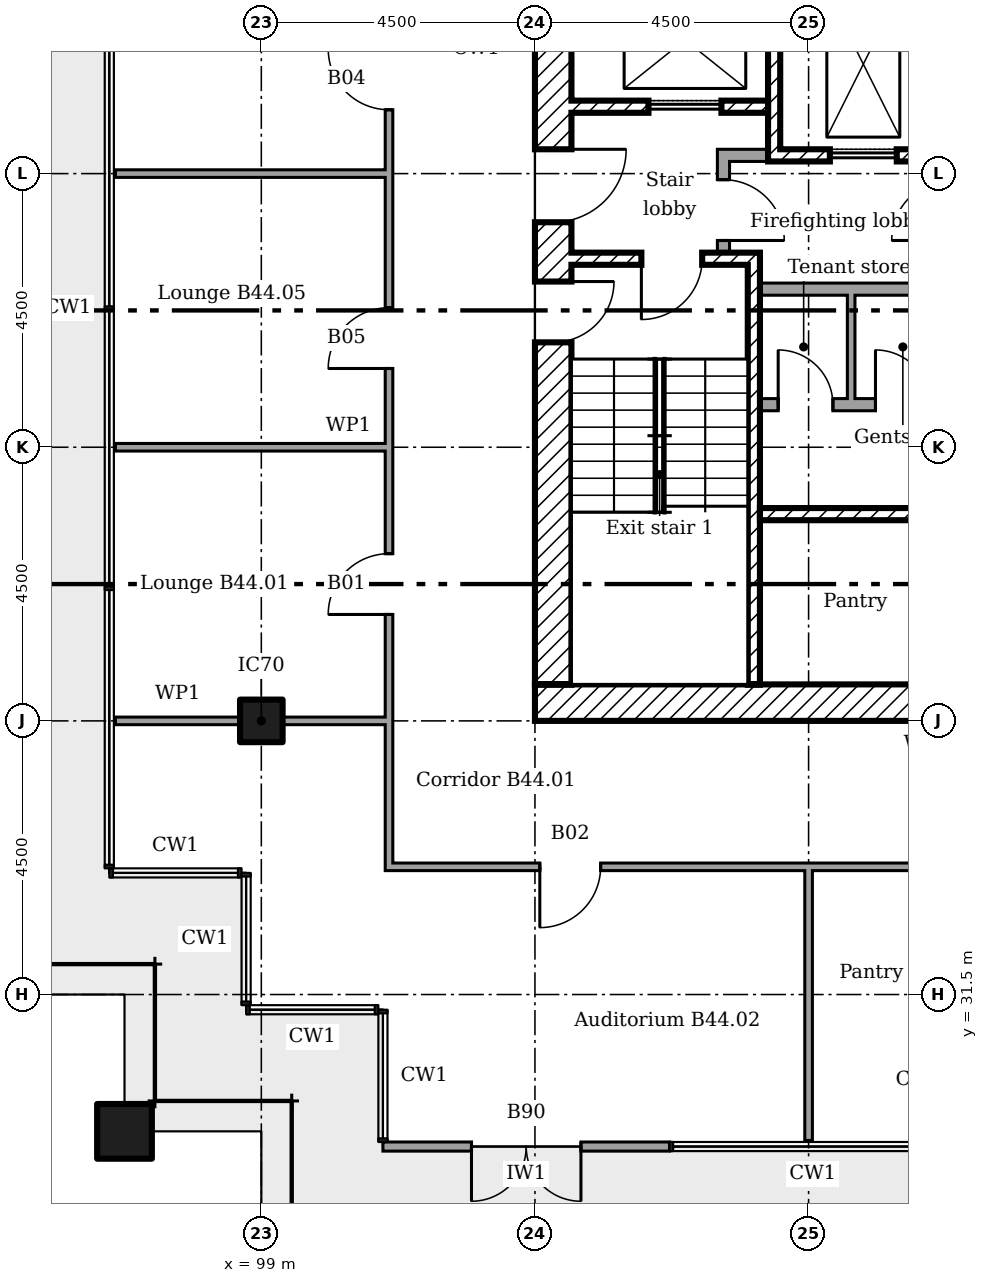
"""IFC4 building model, lengths in metres.
Left out: names, types, materials, properties, quantities, classifications, styles, units other than length and angle.
Written with IfcOpenShell. Run it as: python <this file> out.ifc"""

import sys

from ifc_helpers import new_model, si_unit, direction, frame, frame_2d, origin, origin_2d, place, context, subcontext, project, spatial, rectangle, extrude, element, fill, save


model = new_model("IFC4")
c1 = context("Model", 3, precision=1e-05, world=origin(), true_north=direction((0.0, 1.0)))
c2 = subcontext(c1, "Body", "Model", "MODEL_VIEW")
j1 = project(units=[si_unit("LENGTHUNIT", "METRE"), si_unit("PLANEANGLEUNIT", "RADIAN")], contexts=[c1])
p1 = place(None, origin())
s1 = spatial("IfcSite", under=j1, at=p1, CompositionType="ELEMENT")
p2 = place(p1, origin())
s2 = spatial("IfcBuilding", under=s1, at=p2, CompositionType="ELEMENT")
p3 = place(p2, frame((0.0, 0.0, 176.2)))
s3 = spatial("IfcBuildingStorey", under=s2, at=p3, CompositionType="ELEMENT", Elevation=176.2)
p4 = place(p3, frame((96.75, 29.25, 0.0)))
e1 = element("IfcColumn", 1, at=p4, inside=s3, PredefinedType="COLUMN", context=c2, shape_type="SweptSolid", body=[
    extrude(rectangle(XDim=0.9, YDim=0.9, at=origin_2d()), origin(), (0.0, 0.0, 1.0), 3.6),
])
p5 = place(p3, frame((99.0, 36.0, 0.0)))
e2 = element("IfcColumn", 2, at=p5, inside=s3, PredefinedType="COLUMN", context=c2, shape_type="SweptSolid", body=[
    extrude(rectangle(XDim=0.7, YDim=0.7, at=origin_2d()), origin(), (0.0, 0.0, 1.0), 3.6),
])
p6 = place(p3, frame((101.0, 29.0, 0.0)))
e3 = element("IfcWall", 3, at=p6, inside=s3, PredefinedType="SOLIDWALL", context=c2, shape_type="SweptSolid", body=[
    extrude(rectangle(XDim=4.712, YDim=0.15, at=frame_2d((2.356, 0.0))), origin(), (0.0, 0.0, 1.0), 3.45),
])
p7 = place(p6, frame((1.456, 0.0, 0.0)))
e4 = element("IfcOpeningElement", 4, at=p7, cuts=e3, PredefinedType="OPENING", context=c2, shape_type="SweptSolid", body=[
    extrude(rectangle(XDim=1.8, YDim=2.4, at=frame_2d((0.9, 1.2))), frame((0.0, 0.085, 0.0), z_axis=(0.0, -1.0, 0.0), x_axis=(1.0, 0.0, 0.0)), (0.0, 0.0, 1.0), 0.17),
])
p8 = place(p3, frame((103.5, 36.3, 0.0)))
e5 = element("IfcWall", 5, at=p8, inside=s3, PredefinedType="SHEAR", context=c2, shape_type="SweptSolid", body=[
    extrude(rectangle(XDim=12.9, YDim=0.6, at=frame_2d((6.45, 0.0))), origin(), (0.0, 0.0, 1.0), 3.35),
])
p9 = place(p3, frame((103.8, 36.6, 0.0), z_axis=(0.0, 0.0, 1.0), x_axis=(0.0, 1.0, 0.0)))
e6 = element("IfcWall", 6, at=p9, inside=s3, PredefinedType="SHEAR", context=c2, shape_type="SweptSolid", body=[
    extrude(rectangle(XDim=12.3, YDim=0.6, at=frame_2d((6.15, 0.0))), origin(), (0.0, 0.0, 1.0), 3.35),
])
p10 = place(p9, frame((7.6, 0.0, 0.0)))
e7 = element("IfcOpeningElement", 7, at=p10, cuts=e6, PredefinedType="OPENING", context=c2, shape_type="SweptSolid", body=[
    extrude(rectangle(XDim=1.2, YDim=2.1, at=frame_2d((0.6, 1.05))), frame((0.0, 0.31, 0.0), z_axis=(0.0, -1.0, 0.0), x_axis=(1.0, 0.0, 0.0)), (0.0, 0.0, 1.0), 0.62),
])
p11 = place(p9, frame((5.625, 0.0, 0.0)))
e8 = element("IfcOpeningElement", 8, at=p11, cuts=e6, PredefinedType="OPENING", context=c2, shape_type="SweptSolid", body=[
    extrude(rectangle(XDim=1.0, YDim=2.1, at=frame_2d((0.5, 1.05))), frame((0.0, 0.31, 0.0), z_axis=(0.0, -1.0, 0.0), x_axis=(1.0, 0.0, 0.0)), (0.0, 0.0, 1.0), 0.62),
])
p12 = place(p3, frame((107.433, 48.9, 0.0), z_axis=(0.0, 0.0, 1.0), x_axis=(0.0, -1.0, 0.0)))
e9 = element("IfcWall", 9, at=p12, inside=s3, PredefinedType="SHEAR", context=c2, shape_type="SweptSolid", body=[
    extrude(rectangle(XDim=3.7, YDim=0.2, at=frame_2d((1.85, 0.0))), origin(), (0.0, 0.0, 1.0), 3.35),
])
p13 = place(p3, frame((106.5, 45.3, 0.0)))
e10 = element("IfcWall", 10, at=p13, inside=s3, PredefinedType="PARTITIONING", context=c2, shape_type="SweptSolid", body=[
    extrude(rectangle(XDim=0.833, YDim=0.2, at=frame_2d((0.417, 0.0))), origin(), (0.0, 0.0, 1.0), 3.35),
])
p14 = place(p3, frame((106.6, 43.7, 0.0), z_axis=(0.0, 0.0, 1.0), x_axis=(0.0, 1.0, 0.0)))
e11 = element("IfcWall", 11, at=p14, inside=s3, PredefinedType="PARTITIONING", context=c2, shape_type="SweptSolid", body=[
    extrude(rectangle(XDim=1.5, YDim=0.2, at=frame_2d((0.75, 0.0))), origin(), (0.0, 0.0, 1.0), 3.35),
])
p15 = place(p14, frame((0.2, 0.0, 0.0)))
e12 = element("IfcOpeningElement", 12, at=p15, cuts=e11, PredefinedType="OPENING", context=c2, shape_type="SweptSolid", body=[
    extrude(rectangle(XDim=1.0, YDim=2.1, at=frame_2d((0.5, 1.05))), frame((0.0, 0.11, 0.0), z_axis=(0.0, -1.0, 0.0), x_axis=(1.0, 0.0, 0.0)), (0.0, 0.0, 1.0), 0.22),
])
p16 = place(p3, frame((104.1, 46.1, 0.0)))
e13 = element("IfcWall", 13, at=p16, inside=s3, PredefinedType="SHEAR", context=c2, shape_type="SweptSolid", body=[
    extrude(rectangle(XDim=3.233, YDim=0.2, at=frame_2d((1.617, 0.0))), origin(), (0.0, 0.0, 1.0), 3.35),
])
p17 = place(p16, frame((1.267, 0.0, 0.0)))
e14 = element("IfcOpeningElement", 14, at=p17, cuts=e13, PredefinedType="OPENING", context=c2, shape_type="SweptSolid", body=[
    extrude(rectangle(XDim=1.2, YDim=2.1, at=frame_2d((0.6, 1.05))), frame((0.0, 0.11, 0.0), z_axis=(0.0, -1.0, 0.0), x_axis=(1.0, 0.0, 0.0)), (0.0, 0.0, 1.0), 0.22),
])
p18 = place(p3, frame((107.533, 45.3, 0.0)))
e15 = element("IfcWall", 15, at=p18, inside=s3, PredefinedType="SHEAR", context=c2, shape_type="SweptSolid", body=[
    extrude(rectangle(XDim=2.733, YDim=0.2, at=frame_2d((1.367, 0.0))), origin(), (0.0, 0.0, 1.0), 3.35),
])
p19 = place(p18, frame((0.817, 0.0, 0.0)))
e16 = element("IfcOpeningElement", 16, at=p19, cuts=e15, PredefinedType="OPENING", context=c2, shape_type="SweptSolid", body=[
    extrude(rectangle(XDim=1.1, YDim=2.1, at=frame_2d((0.55, 1.05))), frame((0.0, 0.11, 0.0), z_axis=(0.0, -1.0, 0.0), x_axis=(1.0, 0.0, 0.0)), (0.0, 0.0, 1.0), 0.22),
])
p20 = place(p3, frame((107.2, 39.4, 0.0)))
e17 = element("IfcWall", 17, at=p20, inside=s3, PredefinedType="SHEAR", context=c2, shape_type="SweptSolid", body=[
    extrude(rectangle(XDim=9.2, YDim=0.2, at=frame_2d((4.6, 0.0))), origin(), (0.0, 0.0, 1.0), 3.35),
])
p21 = place(p20, frame((3.95, 0.0, 0.0)))
e18 = element("IfcOpeningElement", 18, at=p21, cuts=e17, PredefinedType="OPENING", context=c2, shape_type="SweptSolid", body=[
    extrude(rectangle(XDim=0.9, YDim=2.1, at=frame_2d((0.45, 1.05))), frame((0.0, 0.11, 0.0), z_axis=(0.0, -1.0, 0.0), x_axis=(1.0, 0.0, 0.0)), (0.0, 0.0, 1.0), 0.22),
])
p22 = place(p3, frame((107.1, 36.6, 0.0), z_axis=(0.0, 0.0, 1.0), x_axis=(0.0, 1.0, 0.0)))
e19 = element("IfcWall", 19, at=p22, inside=s3, PredefinedType="SHEAR", context=c2, shape_type="SweptSolid", body=[
    extrude(rectangle(XDim=7.1, YDim=0.2, at=frame_2d((3.55, 0.0))), origin(), (0.0, 0.0, 1.0), 3.35),
])
p23 = place(p3, frame((104.1, 43.6, 0.0)))
e20 = element("IfcWall", 20, at=p23, inside=s3, PredefinedType="SHEAR", context=c2, shape_type="SweptSolid", body=[
    extrude(rectangle(XDim=2.9, YDim=0.2, at=frame_2d((1.45, 0.0))), origin(), (0.0, 0.0, 1.0), 3.35),
])
p24 = place(p23, frame((1.15, 0.0, 0.0)))
e21 = element("IfcOpeningElement", 21, at=p24, cuts=e20, PredefinedType="OPENING", context=c2, shape_type="SweptSolid", body=[
    extrude(rectangle(XDim=1.0, YDim=2.1, at=frame_2d((0.5, 1.05))), frame((0.0, 0.11, 0.0), z_axis=(0.0, -1.0, 0.0), x_axis=(1.0, 0.0, 0.0)), (0.0, 0.0, 1.0), 0.22),
])
p25 = place(p3, frame((107.2, 43.1, 0.0)))
e22 = element("IfcWall", 22, at=p25, inside=s3, PredefinedType="PARTITIONING", context=c2, shape_type="SweptSolid", body=[
    extrude(rectangle(XDim=6.1, YDim=0.2, at=frame_2d((3.05, 0.0))), origin(), (0.0, 0.0, 1.0), 3.35),
])
p26 = place(p25, frame((3.509, 0.0, 0.0)))
e23 = element("IfcOpeningElement", 23, at=p26, cuts=e22, PredefinedType="OPENING", context=c2, shape_type="SweptSolid", body=[
    extrude(rectangle(XDim=0.9, YDim=2.1, at=frame_2d((0.45, 1.05))), frame((0.0, 0.11, 0.0), z_axis=(0.0, -1.0, 0.0), x_axis=(1.0, 0.0, 0.0)), (0.0, 0.0, 1.0), 0.22),
])
p27 = place(p25, frame((4.9, 0.0, 0.0)))
e24 = element("IfcOpeningElement", 24, at=p27, cuts=e22, PredefinedType="OPENING", context=c2, shape_type="SweptSolid", body=[
    extrude(rectangle(XDim=0.9, YDim=2.1, at=frame_2d((0.45, 1.05))), frame((0.0, 0.11, 0.0), z_axis=(0.0, -1.0, 0.0), x_axis=(1.0, 0.0, 0.0)), (0.0, 0.0, 1.0), 0.22),
])
p28 = place(p3, frame((107.2, 41.2, 0.0)))
e25 = element("IfcWall", 25, at=p28, inside=s3, PredefinedType="PARTITIONING", context=c2, shape_type="SweptSolid", body=[
    extrude(rectangle(XDim=6.1, YDim=0.2, at=frame_2d((3.05, 0.0))), origin(), (0.0, 0.0, 1.0), 3.35),
])
p29 = place(p28, frame((0.3, 0.0, 0.0)))
e26 = element("IfcOpeningElement", 26, at=p29, cuts=e25, PredefinedType="OPENING", context=c2, shape_type="SweptSolid", body=[
    extrude(rectangle(XDim=0.9, YDim=2.1, at=frame_2d((0.45, 1.05))), frame((0.0, 0.11, 0.0), z_axis=(0.0, -1.0, 0.0), x_axis=(1.0, 0.0, 0.0)), (0.0, 0.0, 1.0), 0.22),
])
p30 = place(p28, frame((1.9, 0.0, 0.0)))
e27 = element("IfcOpeningElement", 27, at=p30, cuts=e25, PredefinedType="OPENING", context=c2, shape_type="SweptSolid", body=[
    extrude(rectangle(XDim=0.9, YDim=2.1, at=frame_2d((0.45, 1.05))), frame((0.0, 0.11, 0.0), z_axis=(0.0, -1.0, 0.0), x_axis=(1.0, 0.0, 0.0)), (0.0, 0.0, 1.0), 0.22),
])
p31 = place(p3, frame((108.7, 41.3, 0.0), z_axis=(0.0, 0.0, 1.0), x_axis=(0.0, 1.0, 0.0)))
e28 = element("IfcWall", 28, at=p31, inside=s3, PredefinedType="PARTITIONING", context=c2, shape_type="SweptSolid", body=[
    extrude(rectangle(XDim=1.7, YDim=0.125, at=frame_2d((0.85, 0.0))), origin(), (0.0, 0.0, 1.0), 3.35),
])
p32 = place(p3, frame((101.038, 33.6, 0.0)))
e29 = element("IfcWall", 29, at=p32, inside=s3, PredefinedType="PARTITIONING", context=c2, shape_type="SweptSolid", body=[
    extrude(rectangle(XDim=11.712, YDim=0.125, at=frame_2d((5.856, 0.0))), origin(), (0.0, 0.0, 1.0), 3.45),
])
p33 = place(p32, frame((2.542, 0.0, 0.0)))
e30 = element("IfcOpeningElement", 30, at=p33, cuts=e29, PredefinedType="OPENING", context=c2, shape_type="SweptSolid", body=[
    extrude(rectangle(XDim=1.0, YDim=2.1, at=frame_2d((0.5, 1.05))), frame((0.0, 0.073, 0.0), z_axis=(0.0, -1.0, 0.0), x_axis=(1.0, 0.0, 0.0)), (0.0, 0.0, 1.0), 0.145),
])
p34 = place(p32, frame((9.336, 0.0, 0.0)))
e31 = element("IfcOpeningElement", 31, at=p34, cuts=e29, PredefinedType="OPENING", context=c2, shape_type="SweptSolid", body=[
    extrude(rectangle(XDim=1.0, YDim=2.1, at=frame_2d((0.5, 1.05))), frame((0.0, 0.073, 0.0), z_axis=(0.0, -1.0, 0.0), x_axis=(1.0, 0.0, 0.0)), (0.0, 0.0, 1.0), 0.145),
])
p35 = place(p3, frame((96.6, 36.0, 0.0)))
e32 = element("IfcWall", 32, at=p35, inside=s3, PredefinedType="PARTITIONING", context=c2, shape_type="SweptSolid", body=[
    extrude(rectangle(XDim=2.05, YDim=0.125, at=frame_2d((1.025, 0.0))), origin(), (0.0, 0.0, 1.0), 2.842),
])
p36 = place(p3, frame((99.35, 36.0, 0.0)))
e33 = element("IfcWall", 33, at=p36, inside=s3, PredefinedType="PARTITIONING", context=c2, shape_type="SweptSolid", body=[
    extrude(rectangle(XDim=1.75, YDim=0.125, at=frame_2d((0.875, 0.0))), origin(), (0.0, 0.0, 1.0), 2.842),
])
for number, where in (
    (34, (96.6, 40.5, 0.0)),
    (35, (96.6, 45.0, 0.0)),
):
    element("IfcWall", number, at=place(p3, frame(where)), inside=s3, PredefinedType="PARTITIONING", context=c2, shape_type="SweptSolid", body=[
        extrude(rectangle(XDim=4.5, YDim=0.125, at=frame_2d((2.25, 0.0))), origin(), (0.0, 0.0, 1.0), 2.851),
    ])
p37 = place(p3, frame((101.1, 33.663, 0.0), z_axis=(0.0, 0.0, 1.0), x_axis=(0.0, 1.0, 0.0)))
e36 = element("IfcWall", 36, at=p37, inside=s3, PredefinedType="PARTITIONING", context=c2, shape_type="SweptSolid", body=[
    extrude(rectangle(XDim=14.375, YDim=0.125, at=frame_2d((7.188, 0.0))), origin(), (0.0, 0.0, 1.0), 3.45),
])
p38 = place(p37, frame((4.087, 0.0, 0.0)))
e37 = element("IfcOpeningElement", 37, at=p38, cuts=e36, PredefinedType="OPENING", context=c2, shape_type="SweptSolid", body=[
    extrude(rectangle(XDim=1.0, YDim=2.1, at=frame_2d((0.5, 1.05))), frame((0.0, 0.073, 0.0), z_axis=(0.0, -1.0, 0.0), x_axis=(1.0, 0.0, 0.0)), (0.0, 0.0, 1.0), 0.145),
])
p39 = place(p37, frame((12.387, 0.0, 0.0)))
e38 = element("IfcOpeningElement", 38, at=p39, cuts=e36, PredefinedType="OPENING", context=c2, shape_type="SweptSolid", body=[
    extrude(rectangle(XDim=1.0, YDim=2.1, at=frame_2d((0.5, 1.05))), frame((0.0, 0.073, 0.0), z_axis=(0.0, -1.0, 0.0), x_axis=(1.0, 0.0, 0.0)), (0.0, 0.0, 1.0), 0.145),
])
p40 = place(p37, frame((8.133, 0.0, 0.0)))
e39 = element("IfcOpeningElement", 39, at=p40, cuts=e36, PredefinedType="OPENING", context=c2, shape_type="SweptSolid", body=[
    extrude(rectangle(XDim=1.0, YDim=2.1, at=frame_2d((0.5, 1.05))), frame((0.0, 0.073, 0.0), z_axis=(0.0, -1.0, 0.0), x_axis=(1.0, 0.0, 0.0)), (0.0, 0.0, 1.0), 0.145),
])
p41 = place(p3, frame((108.0, 29.1, 0.0), z_axis=(0.0, 0.0, 1.0), x_axis=(0.0, 1.0, 0.0)))
e40 = element("IfcWall", 40, at=p41, inside=s3, PredefinedType="PARTITIONING", context=c2, shape_type="SweptSolid", body=[
    extrude(rectangle(XDim=4.5, YDim=0.125, at=frame_2d((2.25, 0.0))), origin(), (0.0, 0.0, 1.0), 2.851),
])
p42 = place(p7, frame((1.8, 0.0, 0.0), x_axis=(-1.0, 0.0, 0.0)))
e41 = element("IfcDoor", 41, at=p42, inside=s3, OperationType="DOUBLE_DOOR_DOUBLE_SWING", PredefinedType="NOTDEFINED", context=c2, shape_type="SweptSolid", body=[
    extrude(rectangle(XDim=1.8, YDim=2.4, at=frame_2d((0.9, 1.2))), frame((0.0, 0.025, 0.0), z_axis=(0.0, -1.0, 0.0), x_axis=(1.0, 0.0, 0.0)), (0.0, 0.0, 1.0), 0.05),
])
fill(e4, e41)
p43 = place(p10, frame((1.2, 0.0, 0.0), x_axis=(-1.0, 0.0, 0.0)))
e42 = element("IfcDoor", 42, at=p43, inside=s3, OperationType="SINGLE_SWING_RIGHT", PredefinedType="DOOR", context=c2, shape_type="SweptSolid", body=[
    extrude(rectangle(XDim=1.2, YDim=2.1, at=frame_2d((0.6, 1.05))), frame((0.0, 0.025, 0.0), z_axis=(0.0, -1.0, 0.0), x_axis=(1.0, 0.0, 0.0)), (0.0, 0.0, 1.0), 0.05),
])
fill(e7, e42)
p44 = place(p24, frame((1.0, 0.0, 0.0), x_axis=(-1.0, 0.0, 0.0)))
e43 = element("IfcDoor", 43, at=p44, inside=s3, OperationType="SINGLE_SWING_LEFT", PredefinedType="DOOR", context=c2, shape_type="SweptSolid", body=[
    extrude(rectangle(XDim=1.0, YDim=2.1, at=frame_2d((0.5, 1.05))), frame((0.0, 0.025, 0.0), z_axis=(0.0, -1.0, 0.0), x_axis=(1.0, 0.0, 0.0)), (0.0, 0.0, 1.0), 0.05),
])
fill(e21, e43)
p45 = place(p11, frame((1.0, 0.0, 0.0), x_axis=(-1.0, 0.0, 0.0)))
e44 = element("IfcDoor", 44, at=p45, inside=s3, OperationType="SINGLE_SWING_RIGHT", PredefinedType="DOOR", context=c2, shape_type="SweptSolid", body=[
    extrude(rectangle(XDim=1.0, YDim=2.1, at=frame_2d((0.5, 1.05))), frame((0.0, 0.025, 0.0), z_axis=(0.0, -1.0, 0.0), x_axis=(1.0, 0.0, 0.0)), (0.0, 0.0, 1.0), 0.05),
])
fill(e8, e44)
p46 = place(p15, frame((1.0, 0.0, 0.0), x_axis=(-1.0, 0.0, 0.0)))
e45 = element("IfcDoor", 45, at=p46, inside=s3, OperationType="SINGLE_SWING_LEFT", PredefinedType="DOOR", context=c2, shape_type="SweptSolid", body=[
    extrude(rectangle(XDim=1.0, YDim=2.1, at=frame_2d((0.5, 1.05))), frame((0.0, 0.025, 0.0), z_axis=(0.0, -1.0, 0.0), x_axis=(1.0, 0.0, 0.0)), (0.0, 0.0, 1.0), 0.05),
])
fill(e12, e45)
p47 = place(p29, origin())
e46 = element("IfcDoor", 46, at=p47, inside=s3, OperationType="SINGLE_SWING_RIGHT", PredefinedType="DOOR", context=c2, shape_type="SweptSolid", body=[
    extrude(rectangle(XDim=0.9, YDim=2.1, at=frame_2d((0.45, 1.05))), frame((0.0, 0.025, 0.0), z_axis=(0.0, -1.0, 0.0), x_axis=(1.0, 0.0, 0.0)), (0.0, 0.0, 1.0), 0.05),
])
fill(e26, e46)
p48 = place(p30, origin())
e47 = element("IfcDoor", 47, at=p48, inside=s3, OperationType="SINGLE_SWING_RIGHT", PredefinedType="DOOR", context=c2, shape_type="SweptSolid", body=[
    extrude(rectangle(XDim=0.9, YDim=2.1, at=frame_2d((0.45, 1.05))), frame((0.0, 0.025, 0.0), z_axis=(0.0, -1.0, 0.0), x_axis=(1.0, 0.0, 0.0)), (0.0, 0.0, 1.0), 0.05),
])
fill(e27, e47)
p49 = place(p19, origin())
e48 = element("IfcDoor", 48, at=p49, inside=s3, OperationType="SLIDING_TO_LEFT", PredefinedType="DOOR", context=c2, shape_type="SweptSolid", body=[
    extrude(rectangle(XDim=1.1, YDim=2.1, at=frame_2d((0.55, 1.05))), frame((0.0, 0.025, 0.0), z_axis=(0.0, -1.0, 0.0), x_axis=(1.0, 0.0, 0.0)), (0.0, 0.0, 1.0), 0.05),
])
fill(e16, e48)
p50 = place(p17, origin())
e49 = element("IfcDoor", 49, at=p50, inside=s3, OperationType="SLIDING_TO_LEFT", PredefinedType="DOOR", context=c2, shape_type="SweptSolid", body=[
    extrude(rectangle(XDim=1.2, YDim=2.1, at=frame_2d((0.6, 1.05))), frame((0.0, 0.025, 0.0), z_axis=(0.0, -1.0, 0.0), x_axis=(1.0, 0.0, 0.0)), (0.0, 0.0, 1.0), 0.05),
])
fill(e14, e49)
p51 = place(p38, origin())
e50 = element("IfcDoor", 50, at=p51, inside=s3, OperationType="SINGLE_SWING_RIGHT", PredefinedType="DOOR", context=c2, shape_type="SweptSolid", body=[
    extrude(rectangle(XDim=1.0, YDim=2.1, at=frame_2d((0.5, 1.05))), frame((0.0, 0.025, 0.0), z_axis=(0.0, -1.0, 0.0), x_axis=(1.0, 0.0, 0.0)), (0.0, 0.0, 1.0), 0.05),
])
fill(e37, e50)
p52 = place(p33, frame((1.0, 0.0, 0.0), x_axis=(-1.0, 0.0, 0.0)))
e51 = element("IfcDoor", 51, at=p52, inside=s3, OperationType="SINGLE_SWING_LEFT", PredefinedType="DOOR", context=c2, shape_type="SweptSolid", body=[
    extrude(rectangle(XDim=1.0, YDim=2.1, at=frame_2d((0.5, 1.05))), frame((0.0, 0.025, 0.0), z_axis=(0.0, -1.0, 0.0), x_axis=(1.0, 0.0, 0.0)), (0.0, 0.0, 1.0), 0.05),
])
fill(e30, e51)
p53 = place(p39, origin())
e52 = element("IfcDoor", 52, at=p53, inside=s3, OperationType="SINGLE_SWING_LEFT", PredefinedType="DOOR", context=c2, shape_type="SweptSolid", body=[
    extrude(rectangle(XDim=1.0, YDim=2.1, at=frame_2d((0.5, 1.05))), frame((0.0, 0.025, 0.0), z_axis=(0.0, -1.0, 0.0), x_axis=(1.0, 0.0, 0.0)), (0.0, 0.0, 1.0), 0.05),
])
fill(e38, e52)
p54 = place(p40, origin())
e53 = element("IfcDoor", 53, at=p54, inside=s3, OperationType="SINGLE_SWING_RIGHT", PredefinedType="DOOR", context=c2, shape_type="SweptSolid", body=[
    extrude(rectangle(XDim=1.0, YDim=2.1, at=frame_2d((0.5, 1.05))), frame((0.0, 0.025, 0.0), z_axis=(0.0, -1.0, 0.0), x_axis=(1.0, 0.0, 0.0)), (0.0, 0.0, 1.0), 0.05),
])
fill(e39, e53)
save(model, sys.argv[1])
